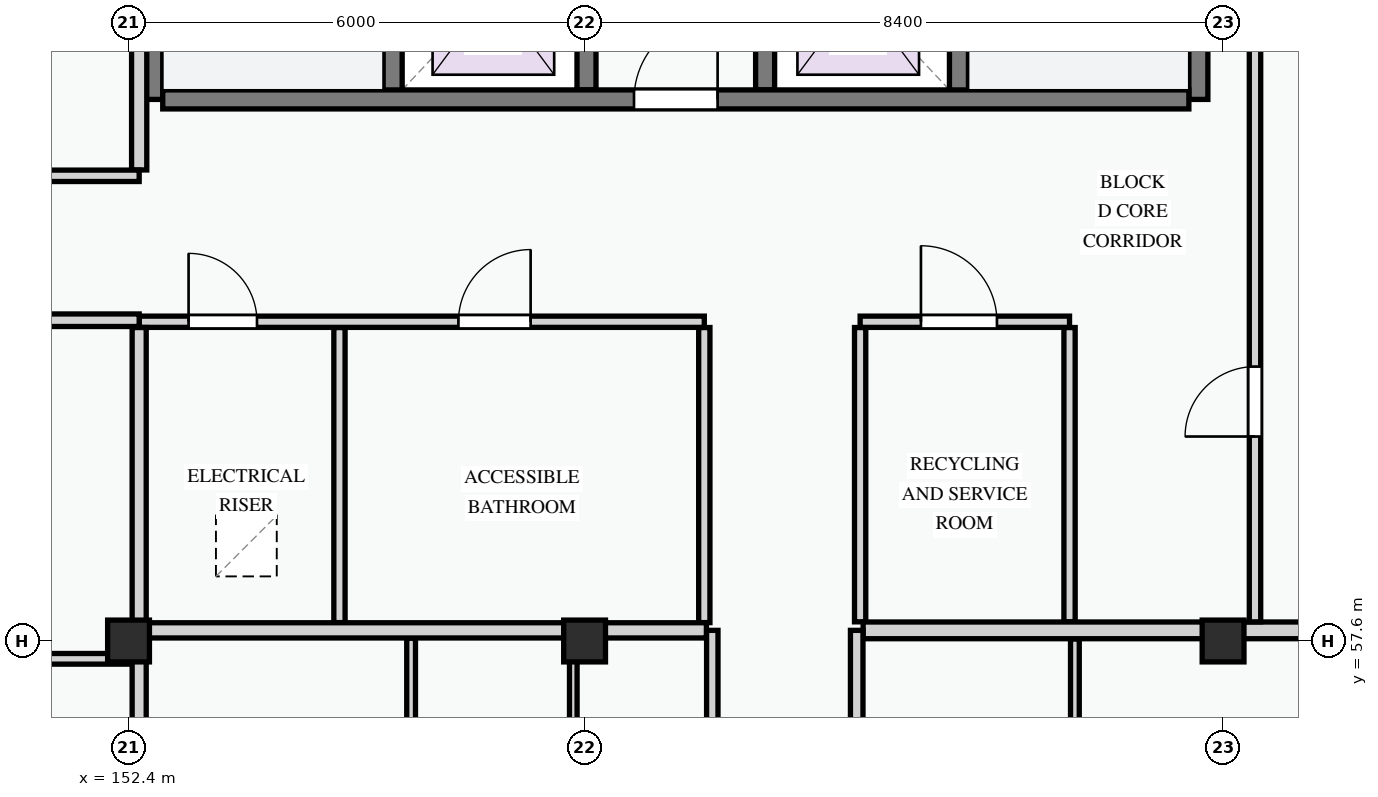
"""IFC4 building model, lengths in metres.
Left out: names, types, materials, properties, quantities, classifications, styles, units other than length and angle.
Written with IfcOpenShell. Run it as: python <this file> out.ifc"""

import sys

from ifc_helpers import new_model, si_unit, direction, frame, frame_2d, origin, origin_2d, place, context, subcontext, project, spatial, rectangle, extrude, element, fill, save


model = new_model("IFC4")
c1 = context("Model", 3, precision=1e-05, world=origin(), true_north=direction((0.0, 1.0)))
c2 = subcontext(c1, "Body", "Model", "MODEL_VIEW")
j1 = project(units=[si_unit("LENGTHUNIT", "METRE"), si_unit("PLANEANGLEUNIT", "RADIAN")], contexts=[c1])
p1 = place(None, origin())
s1 = spatial("IfcSite", under=j1, at=p1, CompositionType="ELEMENT")
p2 = place(p1, origin())
s2 = spatial("IfcBuilding", under=s1, at=p2, CompositionType="ELEMENT")
p3 = place(p2, frame((0.0, 0.0, 8.1)))
s3 = spatial("IfcBuildingStorey", under=s2, at=p3, CompositionType="ELEMENT", Elevation=8.1)
for number, where, z_axis, x_axis in (
    (1, (152.4, 57.6, 0.0), (0.0, 0.0, 1.0), (1.0, 0.0, 0.0)),
    (2, (158.4, 57.6, 0.0), (0.0, 0.0, 1.0), (1.0, 0.0, 0.0)),
    (3, (166.8, 57.6, 0.0), (0.0, 0.0, 1.0), (1.0, 0.0, 0.0)),
):
    element("IfcColumn", number, at=place(p3, frame(where, z_axis=z_axis, x_axis=x_axis)), inside=s3, PredefinedType="COLUMN", context=c2, shape_type="SweptSolid", body=[
        extrude(rectangle(XDim=0.55, YDim=0.55, at=origin_2d()), origin(), (0.0, 0.0, 1.0), 3.3),
    ])
p4 = place(p3, frame((155.875, 71.65, 0.0), z_axis=(0.0, 0.0, 1.0), x_axis=(0.0, -1.0, 0.0)))
e4 = element("IfcWall", 4, at=p4, inside=s3, PredefinedType="SHEAR", context=c2, shape_type="SweptSolid", body=[
    extrude(rectangle(XDim=6.925, YDim=0.25, at=frame_2d((3.462, 0.0))), origin(), (0.0, 0.0, 1.0), 3.0),
])
p5 = place(p4, frame((0.35, 0.0, 0.0)))
e5 = element("IfcOpeningElement", 5, at=p5, cuts=e4, PredefinedType="OPENING", context=c2, shape_type="SweptSolid", body=[
    extrude(rectangle(XDim=0.95, YDim=2.1, at=frame_2d((0.475, 1.05))), frame((0.0, 0.135, 0.0), z_axis=(0.0, -1.0, 0.0), x_axis=(1.0, 0.0, 0.0)), (0.0, 0.0, 1.0), 0.27),
])
p6 = place(p3, frame((152.725, 71.8, 0.0), z_axis=(0.0, 0.0, 1.0), x_axis=(0.0, -1.0, 0.0)))
e6 = element("IfcWall", 6, at=p6, inside=s3, PredefinedType="SHEAR", context=c2, shape_type="SweptSolid", body=[
    extrude(rectangle(XDim=7.075, YDim=0.25, at=frame_2d((3.538, 0.0))), origin(), (0.0, 0.0, 1.0), 3.0),
])
p7 = place(p3, frame((166.475, 71.65, 0.0), z_axis=(0.0, 0.0, 1.0), x_axis=(0.0, -1.0, 0.0)))
e7 = element("IfcWall", 7, at=p7, inside=s3, PredefinedType="SHEAR", context=c2, shape_type="SweptSolid", body=[
    extrude(rectangle(XDim=6.925, YDim=0.25, at=frame_2d((3.462, 0.0))), origin(), (0.0, 0.0, 1.0), 3.0),
])
p8 = place(p3, frame((163.325, 71.65, 0.0), z_axis=(0.0, 0.0, 1.0), x_axis=(0.0, -1.0, 0.0)))
e8 = element("IfcWall", 8, at=p8, inside=s3, PredefinedType="SHEAR", context=c2, shape_type="SweptSolid", body=[
    extrude(rectangle(XDim=6.925, YDim=0.25, at=frame_2d((3.462, 0.0))), origin(), (0.0, 0.0, 1.0), 3.0),
])
p9 = place(p8, frame((0.35, 0.0, 0.0)))
e9 = element("IfcOpeningElement", 9, at=p9, cuts=e8, PredefinedType="OPENING", context=c2, shape_type="SweptSolid", body=[
    extrude(rectangle(XDim=0.95, YDim=2.1, at=frame_2d((0.475, 1.05))), frame((0.0, 0.135, 0.0), z_axis=(0.0, -1.0, 0.0), x_axis=(1.0, 0.0, 0.0)), (0.0, 0.0, 1.0), 0.27),
])
for number, where, z_axis, x_axis in (
    (10, (158.425, 67.275, 0.0), (0.0, 0.0, 1.0), (0.0, -1.0, 0.0)),
    (11, (160.775, 67.275, 0.0), (0.0, 0.0, 1.0), (0.0, -1.0, 0.0)),
):
    element("IfcWall", number, at=place(p3, frame(where, z_axis=z_axis, x_axis=x_axis)), inside=s3, PredefinedType="SHEAR", context=c2, shape_type="SweptSolid", body=[
        extrude(rectangle(XDim=2.425, YDim=0.25, at=frame_2d((1.212, 0.0))), origin(), (0.0, 0.0, 1.0), 3.0),
    ])
p10 = place(p3, frame((152.85, 64.725, 0.0), z_axis=(0.0, 0.0, 1.0), x_axis=(1.0, 0.0, 0.0)))
e12 = element("IfcWall", 12, at=p10, inside=s3, PredefinedType="SHEAR", context=c2, shape_type="SweptSolid", body=[
    extrude(rectangle(XDim=13.5, YDim=0.25, at=frame_2d((6.75, 0.0))), origin(), (0.0, 0.0, 1.0), 3.0),
])
p11 = place(p10, frame((6.2, 0.0, 0.0)))
e13 = element("IfcOpeningElement", 13, at=p11, cuts=e12, PredefinedType="OPENING", context=c2, shape_type="SweptSolid", body=[
    extrude(rectangle(XDim=1.1, YDim=2.15, at=frame_2d((0.55, 1.075))), frame((0.0, 0.135, 0.0), z_axis=(0.0, -1.0, 0.0), x_axis=(1.0, 0.0, 0.0)), (0.0, 0.0, 1.0), 0.27),
])
for number, where, z_axis, x_axis in (
    (14, (155.175, 61.724, 0.0), (0.0, 0.0, 1.0), (0.0, -1.0, 0.0)),
    (15, (159.975, 61.724, 0.0), (0.0, 0.0, 1.0), (0.0, -1.0, 0.0)),
):
    element("IfcWall", number, at=place(p3, frame(where, z_axis=z_axis, x_axis=x_axis)), inside=s3, PredefinedType="PARTITIONING", context=c2, shape_type="SweptSolid", body=[
        extrude(rectangle(XDim=3.882, YDim=0.148, at=frame_2d((1.941, 0.0))), origin(), (0.0, 0.0, 1.0), 3.0),
    ])
for number, where, z_axis, x_axis in (
    (16, (162.025, 61.724, 0.0), (0.0, 0.0, 1.0), (0.0, -1.0, 0.0)),
    (17, (164.78, 61.724, 0.0), (0.0, 0.0, 1.0), (0.0, -1.0, 0.0)),
):
    element("IfcWall", number, at=place(p3, frame(where, z_axis=z_axis, x_axis=x_axis)), inside=s3, PredefinedType="PARTITIONING", context=c2, shape_type="SweptSolid", body=[
        extrude(rectangle(XDim=3.872, YDim=0.148, at=frame_2d((1.936, 0.0))), origin(), (0.0, 0.0, 1.0), 3.0),
    ])
p12 = place(p3, frame((152.54, 61.8, 0.0), z_axis=(0.0, 0.0, 1.0), x_axis=(1.0, 0.0, 0.0)))
e18 = element("IfcWall", 18, at=p12, inside=s3, PredefinedType="PARTITIONING", context=c2, shape_type="SweptSolid", body=[
    extrude(rectangle(XDim=7.435, YDim=0.148, at=frame_2d((3.718, 0.0))), origin(), (0.0, 0.0, 1.0), 3.0),
])
p13 = place(p12, frame((0.65, 0.0, 0.0)))
e19 = element("IfcOpeningElement", 19, at=p13, cuts=e18, PredefinedType="OPENING", context=c2, shape_type="SweptSolid", body=[
    extrude(rectangle(XDim=0.9, YDim=2.1, at=frame_2d((0.45, 1.05))), frame((0.0, 0.084, 0.0), z_axis=(0.0, -1.0, 0.0), x_axis=(1.0, 0.0, 0.0)), (0.0, 0.0, 1.0), 0.168),
])
p14 = place(p12, frame((4.2, 0.0, 0.0)))
e20 = element("IfcOpeningElement", 20, at=p14, cuts=e18, PredefinedType="OPENING", context=c2, shape_type="SweptSolid", body=[
    extrude(rectangle(XDim=0.95, YDim=2.1, at=frame_2d((0.475, 1.05))), frame((0.0, 0.084, 0.0), z_axis=(0.0, -1.0, 0.0), x_axis=(1.0, 0.0, 0.0)), (0.0, 0.0, 1.0), 0.168),
])
p15 = place(p3, frame((162.025, 61.8, 0.0), z_axis=(0.0, 0.0, 1.0), x_axis=(1.0, 0.0, 0.0)))
e21 = element("IfcWall", 21, at=p15, inside=s3, PredefinedType="PARTITIONING", context=c2, shape_type="SweptSolid", body=[
    extrude(rectangle(XDim=2.755, YDim=0.148, at=frame_2d((1.377, 0.0))), origin(), (0.0, 0.0, 1.0), 3.0),
])
p16 = place(p15, frame((0.8, 0.0, 0.0)))
e22 = element("IfcOpeningElement", 22, at=p16, cuts=e21, PredefinedType="OPENING", context=c2, shape_type="SweptSolid", body=[
    extrude(rectangle(XDim=1.0, YDim=2.15, at=frame_2d((0.5, 1.075))), frame((0.0, 0.084, 0.0), z_axis=(0.0, -1.0, 0.0), x_axis=(1.0, 0.0, 0.0)), (0.0, 0.0, 1.0), 0.168),
])
p17 = place(p3, frame((156.118, 49.945, 0.0), z_axis=(0.0, 0.0, 1.0), x_axis=(0.0, 1.0, 0.0)))
e23 = element("IfcWall", 23, at=p17, inside=s3, PredefinedType="PARTITIONING", context=c2, shape_type="SweptSolid", body=[
    extrude(rectangle(XDim=7.693, YDim=0.115, at=frame_2d((3.847, 0.0))), origin(), (0.0, 0.0, 1.0), 3.0),
])
p18 = place(p3, frame((158.251, 49.945, 0.0), z_axis=(0.0, 0.0, 1.0), x_axis=(0.0, 1.0, 0.0)))
e24 = element("IfcWall", 24, at=p18, inside=s3, PredefinedType="PARTITIONING", context=c2, shape_type="SweptSolid", body=[
    extrude(rectangle(XDim=7.693, YDim=0.1, at=frame_2d((3.847, 0.0))), origin(), (0.0, 0.0, 1.0), 2.425),
])
p19 = place(p3, frame((164.85, 49.898, 0.0), z_axis=(0.0, 0.0, 1.0), x_axis=(0.0, 1.0, 0.0)))
e25 = element("IfcWall", 25, at=p19, inside=s3, PredefinedType="PARTITIONING", context=c2, shape_type="SweptSolid", body=[
    extrude(rectangle(XDim=7.73, YDim=0.115, at=frame_2d((3.865, 0.0))), origin(), (0.0, 0.0, 1.0), 3.0),
])
p20 = place(p3, frame((152.635, 57.74, 0.0), z_axis=(0.0, 0.0, 1.0), x_axis=(1.0, 0.0, 0.0)))
e26 = element("IfcWall", 26, at=p20, inside=s3, PredefinedType="PARTITIONING", context=c2, shape_type="SweptSolid", body=[
    extrude(rectangle(XDim=7.368, YDim=0.2, at=frame_2d((3.684, 0.0))), origin(), (0.0, 0.0, 1.0), 2.375),
])
p21 = place(p3, frame((162.064, 57.74, 0.0), z_axis=(0.0, 0.0, 1.0), x_axis=(1.0, 0.0, 0.0)))
e27 = element("IfcWall", 27, at=p21, inside=s3, PredefinedType="PARTITIONING", context=c2, shape_type="SweptSolid", body=[
    extrude(rectangle(XDim=11.766, YDim=0.22, at=frame_2d((5.883, 0.0))), origin(), (0.0, 0.0, 1.0), 2.375),
])
p22 = place(p3, frame((160.08, 37.369, 0.0), z_axis=(0.0, 0.0, 1.0), x_axis=(0.0, 1.0, 0.0)))
e28 = element("IfcWall", 28, at=p22, inside=s3, PredefinedType="PARTITIONING", context=c2, shape_type="SweptSolid", body=[
    extrude(rectangle(XDim=20.371, YDim=0.15, at=frame_2d((10.185, 0.0))), origin(), (0.0, 0.0, 1.0), 3.0),
])
p23 = place(p22, frame((2.333, 0.0, 0.0)))
e29 = element("IfcOpeningElement", 29, at=p23, cuts=e28, PredefinedType="OPENING", context=c2, shape_type="SweptSolid", body=[
    extrude(rectangle(XDim=0.92, YDim=2.1, at=frame_2d((0.46, 1.05))), frame((0.0, 0.085, 0.0), z_axis=(0.0, -1.0, 0.0), x_axis=(1.0, 0.0, 0.0)), (0.0, 0.0, 1.0), 0.17),
])
p24 = place(p22, frame((9.601, 0.0, 0.0)))
e30 = element("IfcOpeningElement", 30, at=p24, cuts=e28, PredefinedType="OPENING", context=c2, shape_type="SweptSolid", body=[
    extrude(rectangle(XDim=0.92, YDim=2.1, at=frame_2d((0.46, 1.05))), frame((0.0, 0.085, 0.0), z_axis=(0.0, -1.0, 0.0), x_axis=(1.0, 0.0, 0.0)), (0.0, 0.0, 1.0), 0.17),
])
p25 = place(p3, frame((161.98, 37.369, 0.0), z_axis=(0.0, 0.0, 1.0), x_axis=(0.0, 1.0, 0.0)))
e31 = element("IfcWall", 31, at=p25, inside=s3, PredefinedType="PARTITIONING", context=c2, shape_type="SweptSolid", body=[
    extrude(rectangle(XDim=20.371, YDim=0.165, at=frame_2d((10.185, 0.0))), origin(), (0.0, 0.0, 1.0), 3.0),
])
p26 = place(p25, frame((2.334, 0.0, 0.0)))
e32 = element("IfcOpeningElement", 32, at=p26, cuts=e31, PredefinedType="OPENING", context=c2, shape_type="SweptSolid", body=[
    extrude(rectangle(XDim=0.92, YDim=2.1, at=frame_2d((0.46, 1.05))), frame((0.0, 0.093, 0.0), z_axis=(0.0, -1.0, 0.0), x_axis=(1.0, 0.0, 0.0)), (0.0, 0.0, 1.0), 0.185),
])
p27 = place(p25, frame((9.573, 0.0, 0.0)))
e33 = element("IfcOpeningElement", 33, at=p27, cuts=e31, PredefinedType="OPENING", context=c2, shape_type="SweptSolid", body=[
    extrude(rectangle(XDim=0.96, YDim=2.12, at=frame_2d((0.48, 1.06))), frame((0.0, 0.093, 0.0), z_axis=(0.0, -1.0, 0.0), x_axis=(1.0, 0.0, 0.0)), (0.0, 0.0, 1.0), 0.185),
])
p28 = place(p3, frame((167.22, 57.852, 0.0), z_axis=(0.0, 0.0, 1.0), x_axis=(0.0, 1.0, 0.0)))
e34 = element("IfcWall", 34, at=p28, inside=s3, PredefinedType="PARTITIONING", context=c2, shape_type="SweptSolid", body=[
    extrude(rectangle(XDim=13.979, YDim=0.15, at=frame_2d((6.989, 0.0))), origin(), (0.0, 0.0, 1.0), 2.425),
])
p29 = place(p28, frame((2.438, 0.0, 0.0)))
e35 = element("IfcOpeningElement", 35, at=p29, cuts=e34, PredefinedType="OPENING", context=c2, shape_type="SweptSolid", body=[
    extrude(rectangle(XDim=0.92, YDim=2.1, at=frame_2d((0.46, 1.05))), frame((0.0, 0.085, 0.0), z_axis=(0.0, -1.0, 0.0), x_axis=(1.0, 0.0, 0.0)), (0.0, 0.0, 1.0), 0.17),
])
p30 = place(p3, frame((145.86, 57.365, 0.0), z_axis=(0.0, 0.0, 1.0), x_axis=(1.0, 0.0, 0.0)))
e36 = element("IfcWall", 36, at=p30, inside=s3, PredefinedType="PARTITIONING", context=c2, shape_type="SweptSolid", body=[
    extrude(rectangle(XDim=6.586, YDim=0.14, at=frame_2d((3.293, 0.0))), origin(), (0.0, 0.0, 1.0), 2.375),
])
p31 = place(p3, frame((152.54, 43.26, 0.0), z_axis=(0.0, 0.0, 1.0), x_axis=(0.0, 1.0, 0.0)))
e37 = element("IfcWall", 37, at=p31, inside=s3, PredefinedType="PARTITIONING", context=c2, shape_type="SweptSolid", body=[
    extrude(rectangle(XDim=18.464, YDim=0.185, at=frame_2d((9.232, 0.0))), origin(), (0.0, 0.0, 1.0), 2.425),
])
p32 = place(p3, frame((152.54, 63.797, 0.0), z_axis=(0.0, 0.0, 1.0), x_axis=(0.0, 1.0, 0.0)))
e38 = element("IfcWall", 38, at=p32, inside=s3, PredefinedType="PARTITIONING", context=c2, shape_type="SweptSolid", body=[
    extrude(rectangle(XDim=8.033, YDim=0.2, at=frame_2d((4.017, 0.0))), origin(), (0.0, 0.0, 1.0), 2.425),
])
p33 = place(p3, frame((138.169, 61.82, 0.0), z_axis=(0.0, 0.0, 1.0), x_axis=(1.0, 0.0, 0.0)))
e39 = element("IfcWall", 39, at=p33, inside=s3, PredefinedType="PARTITIONING", context=c2, shape_type="SweptSolid", body=[
    extrude(rectangle(XDim=14.371, YDim=0.165, at=frame_2d((7.185, 0.0))), origin(), (0.0, 0.0, 1.0), 3.0),
])
p34 = place(p33, frame((2.299, 0.0, 0.0)))
e40 = element("IfcOpeningElement", 40, at=p34, cuts=e39, PredefinedType="OPENING", context=c2, shape_type="SweptSolid", body=[
    extrude(rectangle(XDim=0.92, YDim=2.1, at=frame_2d((0.46, 1.05))), frame((0.0, 0.093, 0.0), z_axis=(0.0, -1.0, 0.0), x_axis=(1.0, 0.0, 0.0)), (0.0, 0.0, 1.0), 0.185),
])
p35 = place(p3, frame((138.169, 63.72, 0.0), z_axis=(0.0, 0.0, 1.0), x_axis=(1.0, 0.0, 0.0)))
e41 = element("IfcWall", 41, at=p35, inside=s3, PredefinedType="PARTITIONING", context=c2, shape_type="SweptSolid", body=[
    extrude(rectangle(XDim=14.371, YDim=0.15, at=frame_2d((7.185, 0.0))), origin(), (0.0, 0.0, 1.0), 3.0),
])
p36 = place(p35, frame((2.303, 0.0, 0.0)))
e42 = element("IfcOpeningElement", 42, at=p36, cuts=e41, PredefinedType="OPENING", context=c2, shape_type="SweptSolid", body=[
    extrude(rectangle(XDim=0.92, YDim=2.1, at=frame_2d((0.46, 1.05))), frame((0.0, 0.085, 0.0), z_axis=(0.0, -1.0, 0.0), x_axis=(1.0, 0.0, 0.0)), (0.0, 0.0, 1.0), 0.17),
])
p37 = place(p11, origin())
e43 = element("IfcDoor", 43, at=p37, inside=s3, OperationType="SINGLE_SWING_RIGHT", PredefinedType="DOOR", context=c2, shape_type="SweptSolid", body=[
    extrude(rectangle(XDim=1.1, YDim=2.15, at=frame_2d((0.55, 1.075))), frame((0.0, 0.025, 0.0), z_axis=(0.0, -1.0, 0.0), x_axis=(1.0, 0.0, 0.0)), (0.0, 0.0, 1.0), 0.05),
])
fill(e13, e43)
p38 = place(p13, origin())
e44 = element("IfcDoor", 44, at=p38, inside=s3, OperationType="SINGLE_SWING_LEFT", PredefinedType="DOOR", context=c2, shape_type="SweptSolid", body=[
    extrude(rectangle(XDim=0.9, YDim=2.1, at=frame_2d((0.45, 1.05))), frame((0.0, 0.025, 0.0), z_axis=(0.0, -1.0, 0.0), x_axis=(1.0, 0.0, 0.0)), (0.0, 0.0, 1.0), 0.05),
])
fill(e19, e44)
p39 = place(p14, origin())
e45 = element("IfcDoor", 45, at=p39, inside=s3, OperationType="SINGLE_SWING_RIGHT", PredefinedType="DOOR", context=c2, shape_type="SweptSolid", body=[
    extrude(rectangle(XDim=0.95, YDim=2.1, at=frame_2d((0.475, 1.05))), frame((0.0, 0.025, 0.0), z_axis=(0.0, -1.0, 0.0), x_axis=(1.0, 0.0, 0.0)), (0.0, 0.0, 1.0), 0.05),
])
fill(e20, e45)
p40 = place(p16, origin())
e46 = element("IfcDoor", 46, at=p40, inside=s3, OperationType="SINGLE_SWING_LEFT", PredefinedType="DOOR", context=c2, shape_type="SweptSolid", body=[
    extrude(rectangle(XDim=1.0, YDim=2.15, at=frame_2d((0.5, 1.075))), frame((0.0, 0.025, 0.0), z_axis=(0.0, -1.0, 0.0), x_axis=(1.0, 0.0, 0.0)), (0.0, 0.0, 1.0), 0.05),
])
fill(e22, e46)
p41 = place(p29, origin())
e47 = element("IfcDoor", 47, at=p41, inside=s3, OperationType="SINGLE_SWING_LEFT", PredefinedType="DOOR", context=c2, shape_type="SweptSolid", body=[
    extrude(rectangle(XDim=0.92, YDim=2.1, at=frame_2d((0.46, 1.05))), frame((0.0, 0.025, 0.0), z_axis=(0.0, -1.0, 0.0), x_axis=(1.0, 0.0, 0.0)), (0.0, 0.0, 1.0), 0.05),
])
fill(e35, e47)
save(model, sys.argv[1])
